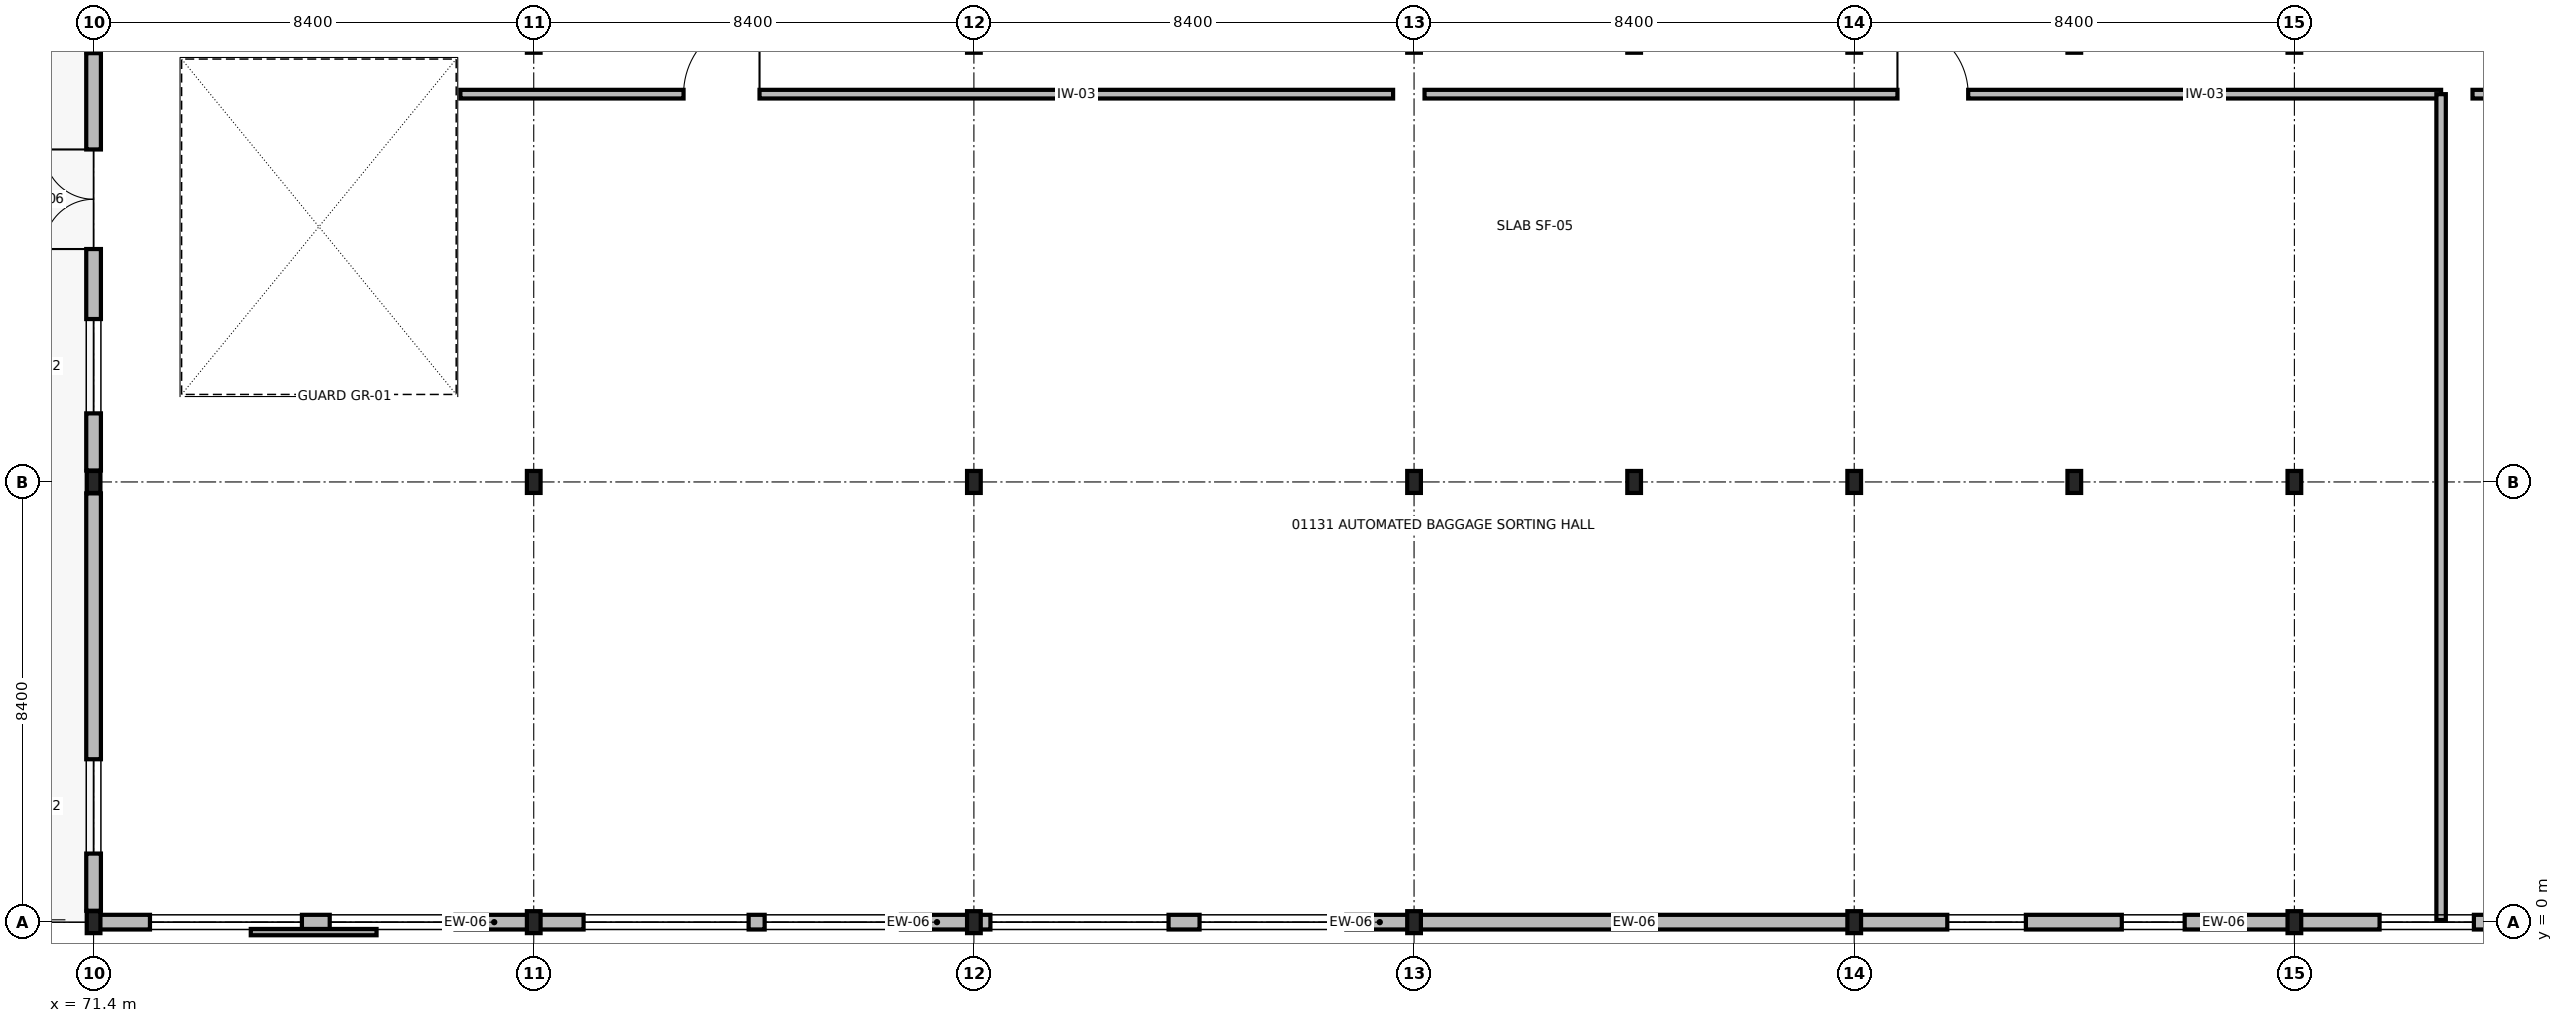
"""IFC4 building model, lengths in metres.
Left out: names, types, materials, properties, quantities, classifications, styles, units other than length and angle.
Written with IfcOpenShell. Run it as: python <this file> out.ifc"""

import sys

from ifc_helpers import new_model, si_unit, direction, frame, frame_2d, origin, origin_2d, place, context, subcontext, project, spatial, rectangle, i_section, extrude, element, fill, save


model = new_model("IFC4")
c1 = context("Model", 3, precision=1e-05, world=origin(), true_north=direction((0.0, 1.0)))
c2 = subcontext(c1, "Body", "Model", "MODEL_VIEW")
j1 = project(units=[si_unit("LENGTHUNIT", "METRE"), si_unit("PLANEANGLEUNIT", "RADIAN")], contexts=[c1])
p1 = place(None, origin())
s1 = spatial("IfcSite", under=j1, at=p1, CompositionType="ELEMENT")
p2 = place(p1, origin())
s2 = spatial("IfcBuilding", under=s1, at=p2, CompositionType="ELEMENT")
p3 = place(p2, frame((0.0, 0.0, 5.1)))
s3 = spatial("IfcBuildingStorey", under=s2, at=p3, CompositionType="ELEMENT", Elevation=5.1)
for number, where, z_axis, x_axis in (
    (1, (71.4, 0.0, 0.0), (0.0, 0.0, 1.0), (1.0, 0.0, 0.0)),
    (2, (71.4, 8.4, 0.0), (0.0, 0.0, 1.0), (1.0, 0.0, 0.0)),
    (3, (71.4, 16.8, 0.0), (0.0, 0.0, 1.0), (1.0, 0.0, 0.0)),
    (4, (79.8, 0.0, 0.0), (0.0, 0.0, 1.0), (1.0, 0.0, 0.0)),
    (5, (79.8, 8.4, 0.0), (0.0, 0.0, 1.0), (1.0, 0.0, 0.0)),
    (6, (79.8, 16.8, 0.0), (0.0, 0.0, 1.0), (1.0, 0.0, 0.0)),
    (7, (88.2, 0.0, 0.0), (0.0, 0.0, 1.0), (1.0, 0.0, 0.0)),
    (8, (88.2, 8.4, 0.0), (0.0, 0.0, 1.0), (1.0, 0.0, 0.0)),
    (9, (88.2, 16.8, 0.0), (0.0, 0.0, 1.0), (1.0, 0.0, 0.0)),
    (10, (96.6, 0.0, 0.0), (0.0, 0.0, 1.0), (1.0, 0.0, 0.0)),
    (11, (96.6, 8.4, 0.0), (0.0, 0.0, 1.0), (1.0, 0.0, 0.0)),
    (12, (96.6, 16.8, 0.0), (0.0, 0.0, 1.0), (1.0, 0.0, 0.0)),
    (13, (105.0, 0.0, 0.0), (0.0, 0.0, 1.0), (1.0, 0.0, 0.0)),
    (14, (105.0, 8.4, 0.0), (0.0, 0.0, 1.0), (1.0, 0.0, 0.0)),
    (15, (105.0, 16.8, 0.0), (0.0, 0.0, 1.0), (1.0, 0.0, 0.0)),
    (16, (113.4, 0.0, 0.0), (0.0, 0.0, 1.0), (1.0, 0.0, 0.0)),
    (17, (113.4, 8.4, 0.0), (0.0, 0.0, 1.0), (1.0, 0.0, 0.0)),
    (18, (113.4, 16.8, 0.0), (0.0, 0.0, 1.0), (1.0, 0.0, 0.0)),
    (19, (100.8, 8.4, 0.0), (0.0, 0.0, 1.0), (1.0, 0.0, 0.0)),
    (20, (100.8, 16.8, 0.0), (0.0, 0.0, 1.0), (1.0, 0.0, 0.0)),
    (21, (109.2, 8.4, 0.0), (0.0, 0.0, 1.0), (1.0, 0.0, 0.0)),
    (22, (109.2, 16.8, 0.0), (0.0, 0.0, 1.0), (1.0, 0.0, 0.0)),
):
    element("IfcColumn", number, at=place(p3, frame(where, z_axis=z_axis, x_axis=x_axis)), inside=s3, PredefinedType="COLUMN", context=c2, shape_type="SweptSolid", body=[
        extrude(i_section(OverallWidth=0.261, OverallDepth=0.419, WebThickness=0.012, FlangeThickness=0.019, at=origin_2d()), origin(), (0.0, 0.0, 1.0), 4.5),
    ])
p4 = place(p3, frame((79.785, 0.0, 0.0), z_axis=(0.0, 0.0, 1.0), x_axis=(-1.0, 0.0, 0.0)))
e23 = element("IfcWall", 23, at=p4, inside=s3, PredefinedType="SOLIDWALL", context=c2, shape_type="SweptSolid", body=[
    extrude(rectangle(XDim=8.37, YDim=0.28, at=frame_2d((4.185, 0.0))), origin(), (0.0, 0.0, 1.0), 3.772),
])
p5 = place(p4, frame((1.479, 0.0, 1.05)))
e24 = element("IfcOpeningElement", 24, at=p5, cuts=e23, PredefinedType="OPENING", context=c2, shape_type="SweptSolid", body=[
    extrude(rectangle(XDim=2.4, YDim=1.45, at=frame_2d((1.2, 0.725))), frame((0.0, 0.15, 0.0), z_axis=(0.0, -1.0, 0.0), x_axis=(1.0, 0.0, 0.0)), (0.0, 0.0, 1.0), 0.3),
])
p6 = place(p4, frame((4.409, 0.0, 1.05)))
e25 = element("IfcOpeningElement", 25, at=p6, cuts=e23, PredefinedType="OPENING", context=c2, shape_type="SweptSolid", body=[
    extrude(rectangle(XDim=2.9, YDim=1.75, at=frame_2d((1.45, 0.875))), frame((0.0, 0.15, 0.0), z_axis=(0.0, -1.0, 0.0), x_axis=(1.0, 0.0, 0.0)), (0.0, 0.0, 1.0), 0.3),
])
p7 = place(p3, frame((88.185, 0.0, 0.0), z_axis=(0.0, 0.0, 1.0), x_axis=(-1.0, 0.0, 0.0)))
e26 = element("IfcWall", 26, at=p7, inside=s3, PredefinedType="SOLIDWALL", context=c2, shape_type="SweptSolid", body=[
    extrude(rectangle(XDim=8.37, YDim=0.28, at=frame_2d((4.185, 0.0))), origin(), (0.0, 0.0, 1.0), 3.772),
])
p8 = place(p7, frame((1.378, 0.0, 1.05)))
e27 = element("IfcOpeningElement", 27, at=p8, cuts=e26, PredefinedType="OPENING", context=c2, shape_type="SweptSolid", body=[
    extrude(rectangle(XDim=2.6, YDim=1.45, at=frame_2d((1.3, 0.725))), frame((0.0, 0.15, 0.0), z_axis=(0.0, -1.0, 0.0), x_axis=(1.0, 0.0, 0.0)), (0.0, 0.0, 1.0), 0.3),
])
p9 = place(p7, frame((4.284, 0.0, 1.05)))
e28 = element("IfcOpeningElement", 28, at=p9, cuts=e26, PredefinedType="OPENING", context=c2, shape_type="SweptSolid", body=[
    extrude(rectangle(XDim=3.15, YDim=1.75, at=frame_2d((1.575, 0.875))), frame((0.0, 0.15, 0.0), z_axis=(0.0, -1.0, 0.0), x_axis=(1.0, 0.0, 0.0)), (0.0, 0.0, 1.0), 0.3),
])
p10 = place(p3, frame((96.585, 0.0, 0.0), z_axis=(0.0, 0.0, 1.0), x_axis=(-1.0, 0.0, 0.0)))
e29 = element("IfcWall", 29, at=p10, inside=s3, PredefinedType="SOLIDWALL", context=c2, shape_type="SweptSolid", body=[
    extrude(rectangle(XDim=8.37, YDim=0.28, at=frame_2d((4.185, 0.0))), origin(), (0.0, 0.0, 1.0), 3.772),
])
p11 = place(p10, frame((1.278, 0.0, 1.05)))
e30 = element("IfcOpeningElement", 30, at=p11, cuts=e29, PredefinedType="OPENING", context=c2, shape_type="SweptSolid", body=[
    extrude(rectangle(XDim=2.8, YDim=1.45, at=frame_2d((1.4, 0.725))), frame((0.0, 0.15, 0.0), z_axis=(0.0, -1.0, 0.0), x_axis=(1.0, 0.0, 0.0)), (0.0, 0.0, 1.0), 0.3),
])
p12 = place(p10, frame((4.67, 0.0, 1.05)))
e31 = element("IfcOpeningElement", 31, at=p12, cuts=e29, PredefinedType="OPENING", context=c2, shape_type="SweptSolid", body=[
    extrude(rectangle(XDim=3.4, YDim=1.75, at=frame_2d((1.7, 0.875))), frame((0.0, 0.15, 0.0), z_axis=(0.0, -1.0, 0.0), x_axis=(1.0, 0.0, 0.0)), (0.0, 0.0, 1.0), 0.3),
])
p13 = place(p3, frame((104.985, 0.0, 0.0), z_axis=(0.0, 0.0, 1.0), x_axis=(-1.0, 0.0, 0.0)))
e32 = element("IfcWall", 32, at=p13, inside=s3, PredefinedType="SOLIDWALL", context=c2, shape_type="SweptSolid", body=[
    extrude(rectangle(XDim=8.37, YDim=0.28, at=frame_2d((4.185, 0.0))), origin(), (0.0, 0.0, 1.0), 3.772),
])
p14 = place(p3, frame((113.385, 0.0, 0.0), z_axis=(0.0, 0.0, 1.0), x_axis=(-1.0, 0.0, 0.0)))
e33 = element("IfcWall", 33, at=p14, inside=s3, PredefinedType="SOLIDWALL", context=c2, shape_type="SweptSolid", body=[
    extrude(rectangle(XDim=8.37, YDim=0.28, at=frame_2d((4.185, 0.0))), origin(), (0.0, 0.0, 1.0), 3.772),
])
p15 = place(p14, frame((2.078, 0.0, 1.05)))
e34 = element("IfcOpeningElement", 34, at=p15, cuts=e33, PredefinedType="OPENING", context=c2, shape_type="SweptSolid", body=[
    extrude(rectangle(XDim=1.2, YDim=1.75, at=frame_2d((0.6, 0.875))), frame((0.0, 0.15, 0.0), z_axis=(0.0, -1.0, 0.0), x_axis=(1.0, 0.0, 0.0)), (0.0, 0.0, 1.0), 0.3),
])
p16 = place(p14, frame((5.109, 0.0, 1.05)))
e35 = element("IfcOpeningElement", 35, at=p16, cuts=e33, PredefinedType="OPENING", context=c2, shape_type="SweptSolid", body=[
    extrude(rectangle(XDim=1.5, YDim=2.05, at=frame_2d((0.75, 1.025))), frame((0.0, 0.15, 0.0), z_axis=(0.0, -1.0, 0.0), x_axis=(1.0, 0.0, 0.0)), (0.0, 0.0, 1.0), 0.3),
])
p17 = place(p3, frame((121.785, 0.0, 0.0), z_axis=(0.0, 0.0, 1.0), x_axis=(-1.0, 0.0, 0.0)))
e36 = element("IfcWall", 36, at=p17, inside=s3, PredefinedType="SOLIDWALL", context=c2, shape_type="SweptSolid", body=[
    extrude(rectangle(XDim=8.37, YDim=0.28, at=frame_2d((4.185, 0.0))), origin(), (0.0, 0.0, 1.0), 3.772),
])
p18 = place(p17, frame((1.979, 0.0, 1.05)))
e37 = element("IfcOpeningElement", 37, at=p18, cuts=e36, PredefinedType="OPENING", context=c2, shape_type="SweptSolid", body=[
    extrude(rectangle(XDim=1.4, YDim=1.75, at=frame_2d((0.7, 0.875))), frame((0.0, 0.15, 0.0), z_axis=(0.0, -1.0, 0.0), x_axis=(1.0, 0.0, 0.0)), (0.0, 0.0, 1.0), 0.3),
])
p19 = place(p17, frame((4.959, 0.0, 1.05)))
e38 = element("IfcOpeningElement", 38, at=p19, cuts=e36, PredefinedType="OPENING", context=c2, shape_type="SweptSolid", body=[
    extrude(rectangle(XDim=1.8, YDim=2.05, at=frame_2d((0.9, 1.025))), frame((0.0, 0.15, 0.0), z_axis=(0.0, -1.0, 0.0), x_axis=(1.0, 0.0, 0.0)), (0.0, 0.0, 1.0), 0.3),
])
p20 = place(p3, frame((71.4, 0.218, 0.0), z_axis=(0.0, 0.0, 1.0), x_axis=(0.0, 1.0, 0.0)))
e39 = element("IfcWall", 39, at=p20, inside=s3, PredefinedType="SOLIDWALL", context=c2, shape_type="SweptSolid", body=[
    extrude(rectangle(XDim=7.965, YDim=0.28, at=frame_2d((3.982, 0.0))), origin(), (0.0, 0.0, 1.0), 3.623),
])
p21 = place(p20, frame((1.091, 0.0, 0.9)))
e40 = element("IfcOpeningElement", 40, at=p21, cuts=e39, PredefinedType="OPENING", context=c2, shape_type="SweptSolid", body=[
    extrude(rectangle(XDim=1.8, YDim=1.75, at=frame_2d((0.9, 0.875))), frame((0.0, 0.15, 0.0), z_axis=(0.0, -1.0, 0.0), x_axis=(1.0, 0.0, 0.0)), (0.0, 0.0, 1.0), 0.3),
])
p22 = place(p3, frame((71.4, 8.617, 0.0), z_axis=(0.0, 0.0, 1.0), x_axis=(0.0, 1.0, 0.0)))
e41 = element("IfcWall", 41, at=p22, inside=s3, PredefinedType="SOLIDWALL", context=c2, shape_type="SweptSolid", body=[
    extrude(rectangle(XDim=7.965, YDim=0.28, at=frame_2d((3.982, 0.0))), origin(), (0.0, 0.0, 1.0), 3.623),
])
p23 = place(p22, frame((4.227, 0.0, 0.0)))
e42 = element("IfcOpeningElement", 42, at=p23, cuts=e41, PredefinedType="OPENING", context=c2, shape_type="SweptSolid", body=[
    extrude(rectangle(XDim=1.9, YDim=2.3, at=frame_2d((0.95, 1.15))), frame((0.0, 0.15, 0.0), z_axis=(0.0, -1.0, 0.0), x_axis=(1.0, 0.0, 0.0)), (0.0, 0.0, 1.0), 0.3),
])
p24 = place(p22, frame((1.091, 0.0, 0.9)))
e43 = element("IfcOpeningElement", 43, at=p24, cuts=e41, PredefinedType="OPENING", context=c2, shape_type="SweptSolid", body=[
    extrude(rectangle(XDim=1.8, YDim=1.75, at=frame_2d((0.9, 0.875))), frame((0.0, 0.15, 0.0), z_axis=(0.0, -1.0, 0.0), x_axis=(1.0, 0.0, 0.0)), (0.0, 0.0, 1.0), 0.3),
])
p25 = place(p3, frame((116.8, 15.8, 0.0), z_axis=(0.0, 0.0, 1.0), x_axis=(1.0, 0.0, 0.0)))
e44 = element("IfcWall", 44, at=p25, inside=s3, PredefinedType="PARTITIONING", context=c2, shape_type="SweptSolid", body=[
    extrude(rectangle(XDim=6.0, YDim=0.165, at=frame_2d((3.0, 0.0))), origin(), (0.0, 0.0, 1.0), 3.623),
])
p26 = place(p3, frame((78.4, 15.8, 0.0), z_axis=(0.0, 0.0, 1.0), x_axis=(1.0, 0.0, 0.0)))
e45 = element("IfcWall", 45, at=p26, inside=s3, PredefinedType="PARTITIONING", context=c2, shape_type="SweptSolid", body=[
    extrude(rectangle(XDim=17.8, YDim=0.165, at=frame_2d((8.9, 0.0))), origin(), (0.0, 0.0, 1.0), 3.623),
])
p27 = place(p26, frame((4.259, 0.0, 0.0)))
e46 = element("IfcOpeningElement", 46, at=p27, cuts=e45, PredefinedType="OPENING", context=c2, shape_type="SweptSolid", body=[
    extrude(rectangle(XDim=1.45, YDim=2.25, at=frame_2d((0.725, 1.125))), frame((0.0, 0.093, 0.0), z_axis=(0.0, -1.0, 0.0), x_axis=(1.0, 0.0, 0.0)), (0.0, 0.0, 1.0), 0.185),
])
p28 = place(p3, frame((96.8, 15.8, 0.0), z_axis=(0.0, 0.0, 1.0), x_axis=(1.0, 0.0, 0.0)))
e47 = element("IfcWall", 47, at=p28, inside=s3, PredefinedType="PARTITIONING", context=c2, shape_type="SweptSolid", body=[
    extrude(rectangle(XDim=19.4, YDim=0.165, at=frame_2d((9.7, 0.0))), origin(), (0.0, 0.0, 1.0), 3.623),
])
p29 = place(p28, frame((9.025, 0.0, 0.0)))
e48 = element("IfcOpeningElement", 48, at=p29, cuts=e47, PredefinedType="OPENING", context=c2, shape_type="SweptSolid", body=[
    extrude(rectangle(XDim=1.35, YDim=2.2, at=frame_2d((0.675, 1.1))), frame((0.0, 0.093, 0.0), z_axis=(0.0, -1.0, 0.0), x_axis=(1.0, 0.0, 0.0)), (0.0, 0.0, 1.0), 0.185),
])
p30 = place(p3, frame((116.2, 0.04, 0.0), z_axis=(0.0, 0.0, 1.0), x_axis=(0.0, 1.0, 0.0)))
e49 = element("IfcWall", 49, at=p30, inside=s3, PredefinedType="PARTITIONING", context=c2, shape_type="SweptSolid", body=[
    extrude(rectangle(XDim=15.76, YDim=0.18, at=frame_2d((7.88, 0.0))), origin(), (0.0, 0.0, 1.0), 3.623),
])
p31 = place(p5, origin())
e50 = element("IfcWindow", 50, at=p31, inside=s3, PartitioningType="SINGLE_PANEL", PredefinedType="WINDOW", context=c2, shape_type="SweptSolid", body=[
    extrude(rectangle(XDim=2.4, YDim=1.45, at=frame_2d((1.2, 0.725))), frame((0.0, 0.03, 0.0), z_axis=(0.0, -1.0, 0.0), x_axis=(1.0, 0.0, 0.0)), (0.0, 0.0, 1.0), 0.06),
])
fill(e24, e50)
p32 = place(p6, origin())
e51 = element("IfcWindow", 51, at=p32, inside=s3, PartitioningType="SINGLE_PANEL", PredefinedType="WINDOW", context=c2, shape_type="SweptSolid", body=[
    extrude(rectangle(XDim=2.9, YDim=1.75, at=frame_2d((1.45, 0.875))), frame((0.0, 0.03, 0.0), z_axis=(0.0, -1.0, 0.0), x_axis=(1.0, 0.0, 0.0)), (0.0, 0.0, 1.0), 0.06),
])
fill(e25, e51)
p33 = place(p8, origin())
e52 = element("IfcWindow", 52, at=p33, inside=s3, PartitioningType="SINGLE_PANEL", PredefinedType="WINDOW", context=c2, shape_type="SweptSolid", body=[
    extrude(rectangle(XDim=2.6, YDim=1.45, at=frame_2d((1.3, 0.725))), frame((0.0, 0.03, 0.0), z_axis=(0.0, -1.0, 0.0), x_axis=(1.0, 0.0, 0.0)), (0.0, 0.0, 1.0), 0.06),
])
fill(e27, e52)
p34 = place(p9, origin())
e53 = element("IfcWindow", 53, at=p34, inside=s3, PartitioningType="SINGLE_PANEL", PredefinedType="WINDOW", context=c2, shape_type="SweptSolid", body=[
    extrude(rectangle(XDim=3.15, YDim=1.75, at=frame_2d((1.575, 0.875))), frame((0.0, 0.03, 0.0), z_axis=(0.0, -1.0, 0.0), x_axis=(1.0, 0.0, 0.0)), (0.0, 0.0, 1.0), 0.06),
])
fill(e28, e53)
p35 = place(p11, origin())
e54 = element("IfcWindow", 54, at=p35, inside=s3, PartitioningType="SINGLE_PANEL", PredefinedType="WINDOW", context=c2, shape_type="SweptSolid", body=[
    extrude(rectangle(XDim=2.8, YDim=1.45, at=frame_2d((1.4, 0.725))), frame((0.0, 0.03, 0.0), z_axis=(0.0, -1.0, 0.0), x_axis=(1.0, 0.0, 0.0)), (0.0, 0.0, 1.0), 0.06),
])
fill(e30, e54)
p36 = place(p12, origin())
e55 = element("IfcWindow", 55, at=p36, inside=s3, PartitioningType="SINGLE_PANEL", PredefinedType="WINDOW", context=c2, shape_type="SweptSolid", body=[
    extrude(rectangle(XDim=3.4, YDim=1.75, at=frame_2d((1.7, 0.875))), frame((0.0, 0.03, 0.0), z_axis=(0.0, -1.0, 0.0), x_axis=(1.0, 0.0, 0.0)), (0.0, 0.0, 1.0), 0.06),
])
fill(e31, e55)
p37 = place(p15, origin())
e56 = element("IfcWindow", 56, at=p37, inside=s3, PartitioningType="SINGLE_PANEL", PredefinedType="WINDOW", context=c2, shape_type="SweptSolid", body=[
    extrude(rectangle(XDim=1.2, YDim=1.75, at=frame_2d((0.6, 0.875))), frame((0.0, 0.03, 0.0), z_axis=(0.0, -1.0, 0.0), x_axis=(1.0, 0.0, 0.0)), (0.0, 0.0, 1.0), 0.06),
])
fill(e34, e56)
p38 = place(p16, origin())
e57 = element("IfcWindow", 57, at=p38, inside=s3, PartitioningType="SINGLE_PANEL", PredefinedType="WINDOW", context=c2, shape_type="SweptSolid", body=[
    extrude(rectangle(XDim=1.5, YDim=2.05, at=frame_2d((0.75, 1.025))), frame((0.0, 0.03, 0.0), z_axis=(0.0, -1.0, 0.0), x_axis=(1.0, 0.0, 0.0)), (0.0, 0.0, 1.0), 0.06),
])
fill(e35, e57)
p39 = place(p19, origin())
e58 = element("IfcWindow", 58, at=p39, inside=s3, PartitioningType="SINGLE_PANEL", PredefinedType="WINDOW", context=c2, shape_type="SweptSolid", body=[
    extrude(rectangle(XDim=1.8, YDim=2.05, at=frame_2d((0.9, 1.025))), frame((0.0, 0.03, 0.0), z_axis=(0.0, -1.0, 0.0), x_axis=(1.0, 0.0, 0.0)), (0.0, 0.0, 1.0), 0.06),
])
fill(e38, e58)
p40 = place(p21, origin())
e59 = element("IfcWindow", 59, at=p40, inside=s3, PartitioningType="SINGLE_PANEL", PredefinedType="WINDOW", context=c2, shape_type="SweptSolid", body=[
    extrude(rectangle(XDim=1.8, YDim=1.75, at=frame_2d((0.9, 0.875))), frame((0.0, 0.03, 0.0), z_axis=(0.0, -1.0, 0.0), x_axis=(1.0, 0.0, 0.0)), (0.0, 0.0, 1.0), 0.06),
])
fill(e40, e59)
p41 = place(p23, origin())
e60 = element("IfcDoor", 60, at=p41, inside=s3, OperationType="DOUBLE_DOOR_SINGLE_SWING", PredefinedType="DOOR", context=c2, shape_type="SweptSolid", body=[
    extrude(rectangle(XDim=1.9, YDim=2.3, at=frame_2d((0.95, 1.15))), frame((0.0, 0.025, 0.0), z_axis=(0.0, -1.0, 0.0), x_axis=(1.0, 0.0, 0.0)), (0.0, 0.0, 1.0), 0.05),
])
fill(e42, e60)
p42 = place(p24, origin())
e61 = element("IfcWindow", 61, at=p42, inside=s3, PartitioningType="SINGLE_PANEL", PredefinedType="WINDOW", context=c2, shape_type="SweptSolid", body=[
    extrude(rectangle(XDim=1.8, YDim=1.75, at=frame_2d((0.9, 0.875))), frame((0.0, 0.03, 0.0), z_axis=(0.0, -1.0, 0.0), x_axis=(1.0, 0.0, 0.0)), (0.0, 0.0, 1.0), 0.06),
])
fill(e43, e61)
p43 = place(p27, origin())
e62 = element("IfcDoor", 62, at=p43, inside=s3, OperationType="SINGLE_SWING_RIGHT", PredefinedType="DOOR", context=c2, shape_type="SweptSolid", body=[
    extrude(rectangle(XDim=1.45, YDim=2.25, at=frame_2d((0.725, 1.125))), frame((0.0, 0.025, 0.0), z_axis=(0.0, -1.0, 0.0), x_axis=(1.0, 0.0, 0.0)), (0.0, 0.0, 1.0), 0.05),
])
fill(e46, e62)
p44 = place(p29, origin())
e63 = element("IfcDoor", 63, at=p44, inside=s3, OperationType="SINGLE_SWING_LEFT", PredefinedType="DOOR", context=c2, shape_type="SweptSolid", body=[
    extrude(rectangle(XDim=1.35, YDim=2.2, at=frame_2d((0.675, 1.1))), frame((0.0, 0.025, 0.0), z_axis=(0.0, -1.0, 0.0), x_axis=(1.0, 0.0, 0.0)), (0.0, 0.0, 1.0), 0.05),
])
fill(e48, e63)
save(model, sys.argv[1])
